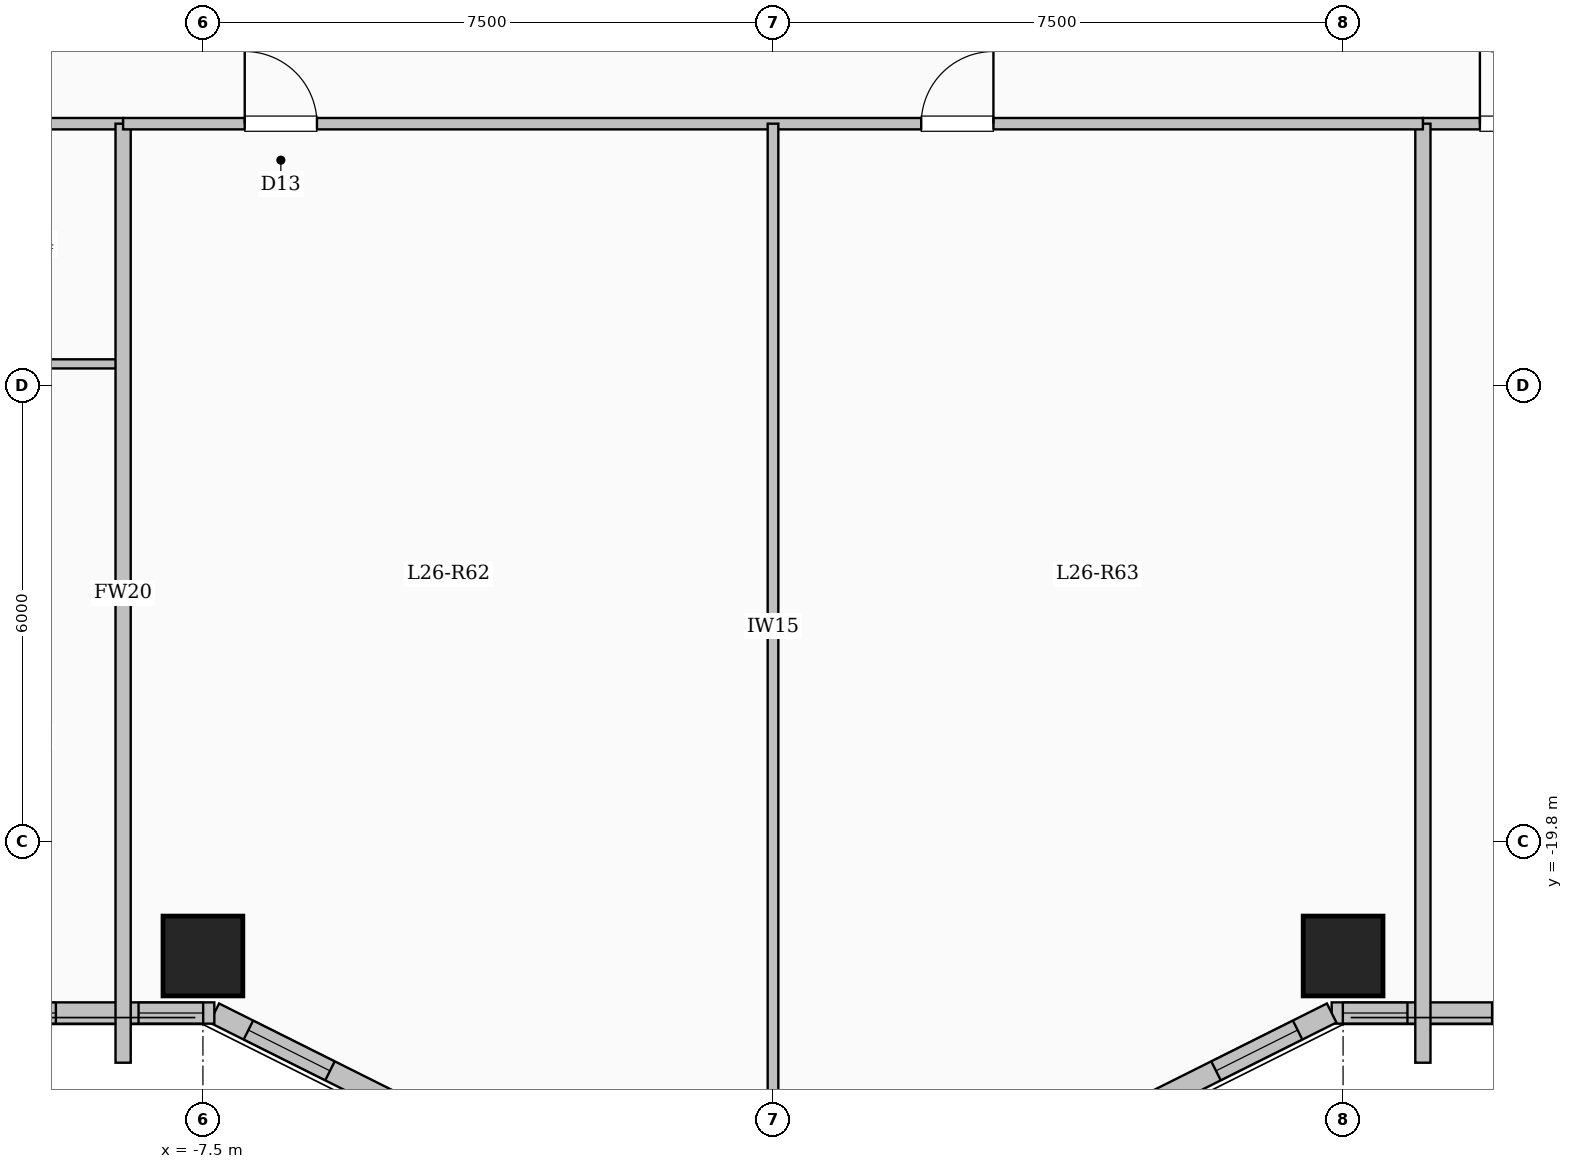
"""IFC4 building model, lengths in metres.
Left out: names, types, materials, properties, quantities, classifications, styles, units other than length and angle.
Written with IfcOpenShell. Run it as: python <this file> out.ifc"""

import sys

from ifc_helpers import new_model, si_unit, direction, frame, frame_2d, origin, origin_2d, place, context, subcontext, project, spatial, rectangle, extrude, element, fill, save


model = new_model("IFC4")
c1 = context("Model", 3, precision=1e-05, world=origin(), true_north=direction((0.0, 1.0)))
c2 = subcontext(c1, "Body", "Model", "MODEL_VIEW")
j1 = project(units=[si_unit("LENGTHUNIT", "METRE"), si_unit("PLANEANGLEUNIT", "RADIAN")], contexts=[c1])
p1 = place(None, origin())
s1 = spatial("IfcSite", under=j1, at=p1, CompositionType="ELEMENT")
p2 = place(p1, origin())
s2 = spatial("IfcBuilding", under=s1, at=p2, CompositionType="ELEMENT")
p3 = place(p2, frame((0.0, 0.0, 98.4)))
s3 = spatial("IfcBuildingStorey", under=s2, at=p3, CompositionType="ELEMENT", Elevation=98.4)
for number, where, z_axis, x_axis in (
    (1, (-7.5, -21.3, 0.0), (0.0, 0.0, 1.0), (1.0, 0.0, 0.0)),
    (2, (7.5, -21.3, 0.0), (0.0, 0.0, 1.0), (1.0, 0.0, 0.0)),
):
    element("IfcColumn", number, at=place(p3, frame(where, z_axis=z_axis, x_axis=x_axis)), inside=s3, PredefinedType="COLUMN", context=c2, shape_type="SweptSolid", body=[
        extrude(rectangle(XDim=1.05, YDim=1.05, at=origin_2d()), origin(), (0.0, 0.0, 1.0), 3.35),
    ])
p4 = place(p3, frame((21.15, -22.05, 0.0), z_axis=(0.0, 0.0, 1.0), x_axis=(-1.0, 0.0, 0.0)))
e3 = element("IfcWall", 3, at=p4, inside=s3, PredefinedType="SOLIDWALL", context=c2, shape_type="SweptSolid", body=[
    extrude(rectangle(XDim=13.8, YDim=0.28, at=frame_2d((6.9, 0.0))), origin(), (0.0, 0.0, 1.0), 3.1),
])
p5 = place(p4, frame((0.831, 0.0, 0.9)))
e4 = element("IfcOpeningElement", 4, at=p5, cuts=e3, PredefinedType="OPENING", context=c2, shape_type="SweptSolid", body=[
    extrude(rectangle(XDim=1.5, YDim=1.65, at=frame_2d((0.75, 0.825))), frame((0.0, 0.15, 0.0), z_axis=(0.0, -1.0, 0.0), x_axis=(1.0, 0.0, 0.0)), (0.0, 0.0, 1.0), 0.3),
])
p6 = place(p4, frame((3.967, 0.0, 0.9)))
e5 = element("IfcOpeningElement", 5, at=p6, cuts=e3, PredefinedType="OPENING", context=c2, shape_type="SweptSolid", body=[
    extrude(rectangle(XDim=1.5, YDim=1.65, at=frame_2d((0.75, 0.825))), frame((0.0, 0.15, 0.0), z_axis=(0.0, -1.0, 0.0), x_axis=(1.0, 0.0, 0.0)), (0.0, 0.0, 1.0), 0.3),
])
p7 = place(p4, frame((7.078, 0.0, 0.9)))
e6 = element("IfcOpeningElement", 6, at=p7, cuts=e3, PredefinedType="OPENING", context=c2, shape_type="SweptSolid", body=[
    extrude(rectangle(XDim=1.5, YDim=1.65, at=frame_2d((0.75, 0.825))), frame((0.0, 0.15, 0.0), z_axis=(0.0, -1.0, 0.0), x_axis=(1.0, 0.0, 0.0)), (0.0, 0.0, 1.0), 0.3),
])
p8 = place(p4, frame((10.19, 0.0, 0.9)))
e7 = element("IfcOpeningElement", 7, at=p8, cuts=e3, PredefinedType="OPENING", context=c2, shape_type="SweptSolid", body=[
    extrude(rectangle(XDim=1.5, YDim=1.65, at=frame_2d((0.75, 0.825))), frame((0.0, 0.15, 0.0), z_axis=(0.0, -1.0, 0.0), x_axis=(1.0, 0.0, 0.0)), (0.0, 0.0, 1.0), 0.3),
])
p9 = place(p4, frame((12.803, 0.0, 0.95)))
e8 = element("IfcOpeningElement", 8, at=p9, cuts=e3, PredefinedType="OPENING", context=c2, shape_type="SweptSolid", body=[
    extrude(rectangle(XDim=0.85, YDim=1.5, at=frame_2d((0.425, 0.75))), frame((0.0, 0.15, 0.0), z_axis=(0.0, -1.0, 0.0), x_axis=(1.0, 0.0, 0.0)), (0.0, 0.0, 1.0), 0.3),
])
p10 = place(p3, frame((7.35, -22.05, 0.0), z_axis=(0.0, 0.0, 1.0), x_axis=(-0.894427191, -0.4472135955, 0.0)))
e9 = element("IfcWall", 9, at=p10, inside=s3, PredefinedType="SOLIDWALL", context=c2, shape_type="SweptSolid", body=[
    extrude(rectangle(XDim=3.354, YDim=0.28, at=frame_2d((1.677, 0.0))), origin(), (0.0, 0.0, 1.0), 3.1),
])
p11 = place(p10, frame((0.501, 0.0, 0.95)))
e10 = element("IfcOpeningElement", 10, at=p11, cuts=e9, PredefinedType="OPENING", context=c2, shape_type="SweptSolid", body=[
    extrude(rectangle(XDim=1.2, YDim=1.5, at=frame_2d((0.6, 0.75))), frame((0.0, 0.15, 0.0), z_axis=(0.0, -1.0, 0.0), x_axis=(1.0, 0.0, 0.0)), (0.0, 0.0, 1.0), 0.3),
])
p12 = place(p3, frame((-4.35, -23.55, 0.0), z_axis=(0.0, 0.0, 1.0), x_axis=(-0.894427191, 0.4472135955, 0.0)))
e11 = element("IfcWall", 11, at=p12, inside=s3, PredefinedType="SOLIDWALL", context=c2, shape_type="SweptSolid", body=[
    extrude(rectangle(XDim=3.354, YDim=0.28, at=frame_2d((1.677, 0.0))), origin(), (0.0, 0.0, 1.0), 3.1),
])
p13 = place(p12, frame((1.653, 0.0, 0.95)))
e12 = element("IfcOpeningElement", 12, at=p13, cuts=e11, PredefinedType="OPENING", context=c2, shape_type="SweptSolid", body=[
    extrude(rectangle(XDim=1.2, YDim=1.5, at=frame_2d((0.6, 0.75))), frame((0.0, 0.15, 0.0), z_axis=(0.0, -1.0, 0.0), x_axis=(1.0, 0.0, 0.0)), (0.0, 0.0, 1.0), 0.3),
])
p14 = place(p3, frame((-7.35, -22.05, 0.0), z_axis=(0.0, 0.0, 1.0), x_axis=(-1.0, 0.0, 0.0)))
e13 = element("IfcWall", 13, at=p14, inside=s3, PredefinedType="SOLIDWALL", context=c2, shape_type="SweptSolid", body=[
    extrude(rectangle(XDim=13.8, YDim=0.28, at=frame_2d((6.9, 0.0))), origin(), (0.0, 0.0, 1.0), 3.1),
])
p15 = place(p14, frame((0.147, 0.0, 0.95)))
e14 = element("IfcOpeningElement", 14, at=p15, cuts=e13, PredefinedType="OPENING", context=c2, shape_type="SweptSolid", body=[
    extrude(rectangle(XDim=0.85, YDim=1.5, at=frame_2d((0.425, 0.75))), frame((0.0, 0.15, 0.0), z_axis=(0.0, -1.0, 0.0), x_axis=(1.0, 0.0, 0.0)), (0.0, 0.0, 1.0), 0.3),
])
p16 = place(p14, frame((2.085, 0.0, 0.95)))
e15 = element("IfcOpeningElement", 15, at=p16, cuts=e13, PredefinedType="OPENING", context=c2, shape_type="SweptSolid", body=[
    extrude(rectangle(XDim=1.2, YDim=1.5, at=frame_2d((0.6, 0.75))), frame((0.0, 0.15, 0.0), z_axis=(0.0, -1.0, 0.0), x_axis=(1.0, 0.0, 0.0)), (0.0, 0.0, 1.0), 0.3),
])
p17 = place(p14, frame((4.946, 0.0, 0.9)))
e16 = element("IfcOpeningElement", 16, at=p17, cuts=e13, PredefinedType="OPENING", context=c2, shape_type="SweptSolid", body=[
    extrude(rectangle(XDim=1.5, YDim=1.65, at=frame_2d((0.75, 0.825))), frame((0.0, 0.15, 0.0), z_axis=(0.0, -1.0, 0.0), x_axis=(1.0, 0.0, 0.0)), (0.0, 0.0, 1.0), 0.3),
])
p18 = place(p14, frame((8.007, 0.0, 0.9)))
e17 = element("IfcOpeningElement", 17, at=p18, cuts=e13, PredefinedType="OPENING", context=c2, shape_type="SweptSolid", body=[
    extrude(rectangle(XDim=1.5, YDim=1.65, at=frame_2d((0.75, 0.825))), frame((0.0, 0.15, 0.0), z_axis=(0.0, -1.0, 0.0), x_axis=(1.0, 0.0, 0.0)), (0.0, 0.0, 1.0), 0.3),
])
p19 = place(p14, frame((11.118, 0.0, 0.9)))
e18 = element("IfcOpeningElement", 18, at=p19, cuts=e13, PredefinedType="OPENING", context=c2, shape_type="SweptSolid", body=[
    extrude(rectangle(XDim=1.8, YDim=1.65, at=frame_2d((0.9, 0.825))), frame((0.0, 0.15, 0.0), z_axis=(0.0, -1.0, 0.0), x_axis=(1.0, 0.0, 0.0)), (0.0, 0.0, 1.0), 0.3),
])
p20 = place(p3, frame((-21.05, -10.35, 0.0), z_axis=(0.0, 0.0, 1.0), x_axis=(1.0, 0.0, 0.0)))
e19 = element("IfcWall", 19, at=p20, inside=s3, PredefinedType="PARTITIONING", context=c2, shape_type="SweptSolid", body=[
    extrude(rectangle(XDim=12.5, YDim=0.15, at=frame_2d((6.25, 0.0))), origin(), (0.0, 0.0, 1.0), 3.1),
])
p21 = place(p20, frame((0.7, 0.0, 0.0)))
e20 = element("IfcOpeningElement", 20, at=p21, cuts=e19, PredefinedType="OPENING", context=c2, shape_type="SweptSolid", body=[
    extrude(rectangle(XDim=0.96, YDim=2.15, at=frame_2d((0.48, 1.075))), frame((0.0, 0.085, 0.0), z_axis=(0.0, -1.0, 0.0), x_axis=(1.0, 0.0, 0.0)), (0.0, 0.0, 1.0), 0.17),
])
p22 = place(p20, frame((7.174, 0.0, 0.0)))
e21 = element("IfcOpeningElement", 21, at=p22, cuts=e19, PredefinedType="OPENING", context=c2, shape_type="SweptSolid", body=[
    extrude(rectangle(XDim=0.96, YDim=2.15, at=frame_2d((0.48, 1.075))), frame((0.0, 0.085, 0.0), z_axis=(0.0, -1.0, 0.0), x_axis=(1.0, 0.0, 0.0)), (0.0, 0.0, 1.0), 0.17),
])
p23 = place(p3, frame((8.55, -10.35, 0.0), z_axis=(0.0, 0.0, 1.0), x_axis=(1.0, 0.0, 0.0)))
e22 = element("IfcWall", 22, at=p23, inside=s3, PredefinedType="PARTITIONING", context=c2, shape_type="SweptSolid", body=[
    extrude(rectangle(XDim=12.5, YDim=0.15, at=frame_2d((6.25, 0.0))), origin(), (0.0, 0.0, 1.0), 3.1),
])
p24 = place(p23, frame((0.75, 0.0, 0.0)))
e23 = element("IfcOpeningElement", 23, at=p24, cuts=e22, PredefinedType="OPENING", context=c2, shape_type="SweptSolid", body=[
    extrude(rectangle(XDim=0.96, YDim=2.15, at=frame_2d((0.48, 1.075))), frame((0.0, 0.085, 0.0), z_axis=(0.0, -1.0, 0.0), x_axis=(1.0, 0.0, 0.0)), (0.0, 0.0, 1.0), 0.17),
])
p25 = place(p23, frame((6.975, 0.0, 0.0)))
e24 = element("IfcOpeningElement", 24, at=p25, cuts=e22, PredefinedType="OPENING", context=c2, shape_type="SweptSolid", body=[
    extrude(rectangle(XDim=0.96, YDim=2.15, at=frame_2d((0.48, 1.075))), frame((0.0, 0.085, 0.0), z_axis=(0.0, -1.0, 0.0), x_axis=(1.0, 0.0, 0.0)), (0.0, 0.0, 1.0), 0.17),
])
p26 = place(p3, frame((-11.531, -13.51, 0.0), z_axis=(0.0, 0.0, 1.0), x_axis=(1.0, 0.0, 0.0)))
e25 = element("IfcWall", 25, at=p26, inside=s3, PredefinedType="PARTITIONING", context=c2, shape_type="SweptSolid", body=[
    extrude(rectangle(XDim=2.991, YDim=0.12, at=frame_2d((1.496, 0.0))), origin(), (0.0, 0.0, 1.0), 3.1),
])
for number, where, z_axis, x_axis in (
    (26, (-8.55, -22.704, 0.0), (0.0, 0.0, 1.0), (0.0, 1.0, 0.0)),
    (27, (8.55, -22.704, 0.0), (0.0, 0.0, 1.0), (0.0, 1.0, 0.0)),
):
    element("IfcWall", number, at=place(p3, frame(where, z_axis=z_axis, x_axis=x_axis)), inside=s3, PredefinedType="SOLIDWALL", context=c2, shape_type="SweptSolid", body=[
        extrude(rectangle(XDim=12.354, YDim=0.2, at=frame_2d((6.177, 0.0))), origin(), (0.0, 0.0, 1.0), 3.1),
    ])
p27 = place(p3, frame((-8.55, -10.35, 0.0), z_axis=(0.0, 0.0, 1.0), x_axis=(1.0, 0.0, 0.0)))
e28 = element("IfcWall", 28, at=p27, inside=s3, PredefinedType="PARTITIONING", context=c2, shape_type="SweptSolid", body=[
    extrude(rectangle(XDim=17.1, YDim=0.15, at=frame_2d((8.55, 0.0))), origin(), (0.0, 0.0, 1.0), 3.1),
])
p28 = place(p27, frame((1.6, 0.0, 0.0)))
e29 = element("IfcOpeningElement", 29, at=p28, cuts=e28, PredefinedType="OPENING", context=c2, shape_type="SweptSolid", body=[
    extrude(rectangle(XDim=0.95, YDim=2.15, at=frame_2d((0.475, 1.075))), frame((0.0, 0.085, 0.0), z_axis=(0.0, -1.0, 0.0), x_axis=(1.0, 0.0, 0.0)), (0.0, 0.0, 1.0), 0.17),
])
p29 = place(p27, frame((10.5, 0.0, 0.0)))
e30 = element("IfcOpeningElement", 30, at=p29, cuts=e28, PredefinedType="OPENING", context=c2, shape_type="SweptSolid", body=[
    extrude(rectangle(XDim=0.95, YDim=2.15, at=frame_2d((0.475, 1.075))), frame((0.0, 0.085, 0.0), z_axis=(0.0, -1.0, 0.0), x_axis=(1.0, 0.0, 0.0)), (0.0, 0.0, 1.0), 0.17),
])
p30 = place(p3, frame((0.0, -23.58, 0.0), z_axis=(0.0, 0.0, 1.0), x_axis=(0.0, 1.0, 0.0)))
e31 = element("IfcWall", 31, at=p30, inside=s3, PredefinedType="PARTITIONING", context=c2, shape_type="SweptSolid", body=[
    extrude(rectangle(XDim=13.23, YDim=0.14, at=frame_2d((6.615, 0.0))), origin(), (0.0, 0.0, 1.0), 3.1),
])
p31 = place(p8, origin())
e32 = element("IfcWindow", 32, at=p31, inside=s3, PartitioningType="SINGLE_PANEL", PredefinedType="WINDOW", context=c2, shape_type="SweptSolid", body=[
    extrude(rectangle(XDim=1.5, YDim=1.65, at=frame_2d((0.75, 0.825))), frame((0.0, 0.03, 0.0), z_axis=(0.0, -1.0, 0.0), x_axis=(1.0, 0.0, 0.0)), (0.0, 0.0, 1.0), 0.06),
])
fill(e7, e32)
p32 = place(p9, origin())
e33 = element("IfcWindow", 33, at=p32, inside=s3, PartitioningType="SINGLE_PANEL", PredefinedType="WINDOW", context=c2, shape_type="SweptSolid", body=[
    extrude(rectangle(XDim=0.85, YDim=1.5, at=frame_2d((0.425, 0.75))), frame((0.0, 0.03, 0.0), z_axis=(0.0, -1.0, 0.0), x_axis=(1.0, 0.0, 0.0)), (0.0, 0.0, 1.0), 0.06),
])
fill(e8, e33)
p33 = place(p11, origin())
e34 = element("IfcWindow", 34, at=p33, inside=s3, PartitioningType="SINGLE_PANEL", PredefinedType="WINDOW", context=c2, shape_type="SweptSolid", body=[
    extrude(rectangle(XDim=1.2, YDim=1.5, at=frame_2d((0.6, 0.75))), frame((0.0, 0.03, 0.0), z_axis=(0.0, -1.0, 0.0), x_axis=(1.0, 0.0, 0.0)), (0.0, 0.0, 1.0), 0.06),
])
fill(e10, e34)
p34 = place(p13, origin())
e35 = element("IfcWindow", 35, at=p34, inside=s3, PartitioningType="SINGLE_PANEL", PredefinedType="WINDOW", context=c2, shape_type="SweptSolid", body=[
    extrude(rectangle(XDim=1.2, YDim=1.5, at=frame_2d((0.6, 0.75))), frame((0.0, 0.03, 0.0), z_axis=(0.0, -1.0, 0.0), x_axis=(1.0, 0.0, 0.0)), (0.0, 0.0, 1.0), 0.06),
])
fill(e12, e35)
p35 = place(p15, origin())
e36 = element("IfcWindow", 36, at=p35, inside=s3, PartitioningType="SINGLE_PANEL", PredefinedType="WINDOW", context=c2, shape_type="SweptSolid", body=[
    extrude(rectangle(XDim=0.85, YDim=1.5, at=frame_2d((0.425, 0.75))), frame((0.0, 0.03, 0.0), z_axis=(0.0, -1.0, 0.0), x_axis=(1.0, 0.0, 0.0)), (0.0, 0.0, 1.0), 0.06),
])
fill(e14, e36)
p36 = place(p16, origin())
e37 = element("IfcWindow", 37, at=p36, inside=s3, PartitioningType="SINGLE_PANEL", PredefinedType="WINDOW", context=c2, shape_type="SweptSolid", body=[
    extrude(rectangle(XDim=1.2, YDim=1.5, at=frame_2d((0.6, 0.75))), frame((0.0, 0.03, 0.0), z_axis=(0.0, -1.0, 0.0), x_axis=(1.0, 0.0, 0.0)), (0.0, 0.0, 1.0), 0.06),
])
fill(e15, e37)
p37 = place(p24, origin())
e38 = element("IfcDoor", 38, at=p37, inside=s3, OperationType="SINGLE_SWING_LEFT", PredefinedType="DOOR", context=c2, shape_type="SweptSolid", body=[
    extrude(rectangle(XDim=0.96, YDim=2.15, at=frame_2d((0.48, 1.075))), frame((0.0, 0.025, 0.0), z_axis=(0.0, -1.0, 0.0), x_axis=(1.0, 0.0, 0.0)), (0.0, 0.0, 1.0), 0.05),
])
fill(e23, e38)
p38 = place(p28, origin())
e39 = element("IfcDoor", 39, at=p38, inside=s3, OperationType="SINGLE_SWING_LEFT", PredefinedType="DOOR", context=c2, shape_type="SweptSolid", body=[
    extrude(rectangle(XDim=0.95, YDim=2.15, at=frame_2d((0.475, 1.075))), frame((0.0, 0.025, 0.0), z_axis=(0.0, -1.0, 0.0), x_axis=(1.0, 0.0, 0.0)), (0.0, 0.0, 1.0), 0.05),
])
fill(e29, e39)
p39 = place(p29, origin())
e40 = element("IfcDoor", 40, at=p39, inside=s3, OperationType="SINGLE_SWING_RIGHT", PredefinedType="DOOR", context=c2, shape_type="SweptSolid", body=[
    extrude(rectangle(XDim=0.95, YDim=2.15, at=frame_2d((0.475, 1.075))), frame((0.0, 0.025, 0.0), z_axis=(0.0, -1.0, 0.0), x_axis=(1.0, 0.0, 0.0)), (0.0, 0.0, 1.0), 0.05),
])
fill(e30, e40)
save(model, sys.argv[1])
